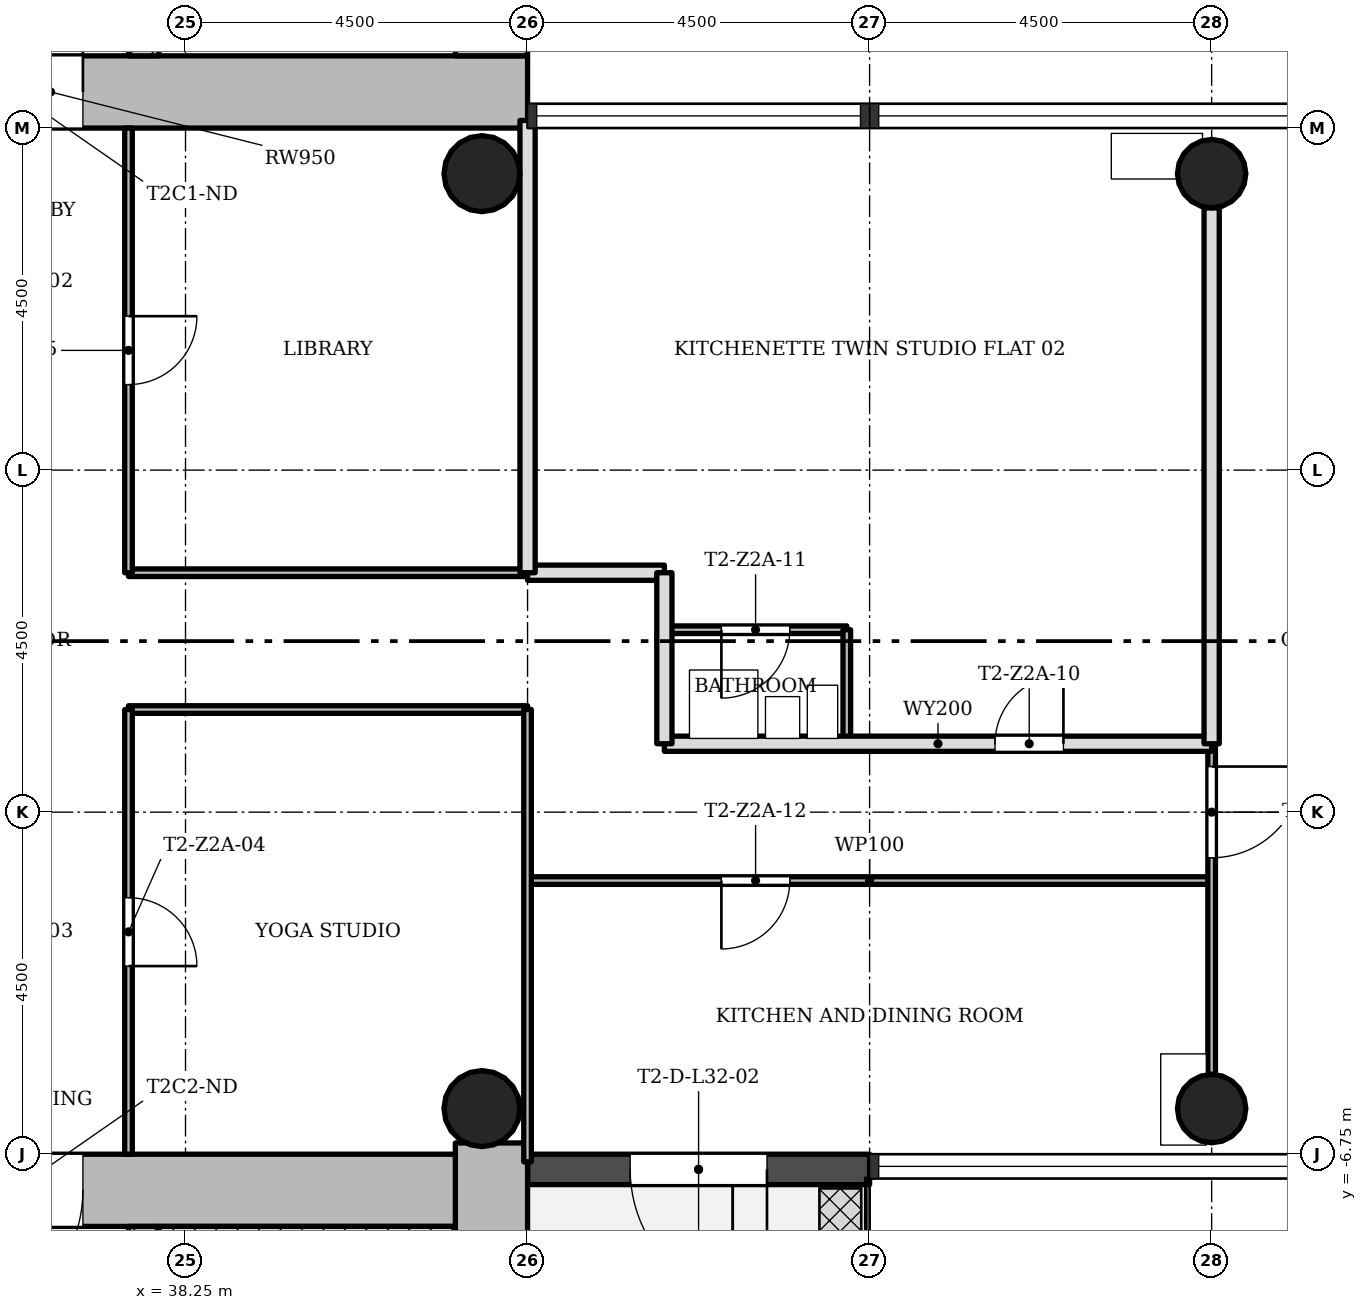
"""IFC4 building model, lengths in metres.
Left out: names, types, materials, properties, quantities, classifications, styles, units other than length and angle.
Written with IfcOpenShell. Run it as: python <this file> out.ifc"""

import sys

from ifc_helpers import new_model, si_unit, direction, frame, frame_2d, origin, origin_2d, place, context, subcontext, project, spatial, rectangle, hollow_circle, extrude, element, fill, save


model = new_model("IFC4")
c1 = context("Model", 3, precision=1e-05, world=origin(), true_north=direction((0.0, 1.0)))
c2 = subcontext(c1, "Body", "Model", "MODEL_VIEW")
j1 = project(units=[si_unit("LENGTHUNIT", "METRE"), si_unit("PLANEANGLEUNIT", "RADIAN")], contexts=[c1])
p1 = place(None, origin())
s1 = spatial("IfcSite", under=j1, at=p1, CompositionType="ELEMENT")
p2 = place(p1, origin())
s2 = spatial("IfcBuilding", under=s1, at=p2, CompositionType="ELEMENT")
p3 = place(p2, frame((0.0, 0.0, 117.4)))
s3 = spatial("IfcBuildingStorey", under=s2, at=p3, CompositionType="ELEMENT", Elevation=117.4)
p4 = place(p3, frame((30.2, 7.225, 0.0), z_axis=(0.0, 0.0, 1.0), x_axis=(1.0, 0.0, 0.0)))
e1 = element("IfcWall", 1, at=p4, inside=s3, PredefinedType="SHEAR", context=c2, shape_type="SweptSolid", body=[
    extrude(rectangle(XDim=12.55, YDim=0.95, at=frame_2d((6.275, 0.0))), origin(), (0.0, 0.0, 1.0), 3.4),
])
p5 = place(p4, frame((4.9, 0.0, 0.0)))
e2 = element("IfcOpeningElement", 2, at=p5, cuts=e1, PredefinedType="OPENING", context=c2, shape_type="SweptSolid", body=[
    extrude(rectangle(XDim=1.8, YDim=2.1, at=frame_2d((0.9, 1.05))), frame((0.0, 0.485, 0.0), z_axis=(0.0, -1.0, 0.0), x_axis=(1.0, 0.0, 0.0)), (0.0, 0.0, 1.0), 0.97),
])
p6 = place(p3, frame((42.275, 7.7, 0.0), z_axis=(0.0, 0.0, 1.0), x_axis=(0.0, 1.0, 0.0)))
e3 = element("IfcWall", 3, at=p6, inside=s3, PredefinedType="SHEAR", context=c2, shape_type="SweptSolid", body=[
    extrude(rectangle(XDim=8.05, YDim=0.95, at=frame_2d((4.025, 0.0))), origin(), (0.0, 0.0, 1.0), 3.4),
])
p7 = place(p3, frame((37.7, 7.7, 0.0), z_axis=(0.0, 0.0, 1.0), x_axis=(0.0, 1.0, 0.0)))
e4 = element("IfcWall", 4, at=p7, inside=s3, PredefinedType="SHEAR", context=c2, shape_type="SweptSolid", body=[
    extrude(rectangle(XDim=7.1, YDim=0.4, at=frame_2d((3.55, 0.0))), origin(), (0.0, 0.0, 1.0), 3.4),
])
p8 = place(p7, frame((0.8, 0.0, 0.0)))
e5 = element("IfcOpeningElement", 5, at=p8, cuts=e4, PredefinedType="OPENING", context=c2, shape_type="SweptSolid", body=[
    extrude(rectangle(XDim=1.1, YDim=2.1, at=frame_2d((0.55, 1.05))), frame((0.0, 0.21, 0.0), z_axis=(0.0, -1.0, 0.0), x_axis=(1.0, 0.0, 0.0)), (0.0, 0.0, 1.0), 0.42),
])
p9 = place(p7, frame((3.0, 0.0, 0.0)))
e6 = element("IfcOpeningElement", 6, at=p9, cuts=e4, PredefinedType="OPENING", context=c2, shape_type="SweptSolid", body=[
    extrude(rectangle(XDim=1.1, YDim=2.1, at=frame_2d((0.55, 1.05))), frame((0.0, 0.21, 0.0), z_axis=(0.0, -1.0, 0.0), x_axis=(1.0, 0.0, 0.0)), (0.0, 0.0, 1.0), 0.42),
])
p10 = place(p7, frame((5.2, 0.0, 0.0)))
e7 = element("IfcOpeningElement", 7, at=p10, cuts=e4, PredefinedType="OPENING", context=c2, shape_type="SweptSolid", body=[
    extrude(rectangle(XDim=1.1, YDim=2.1, at=frame_2d((0.55, 1.05))), frame((0.0, 0.21, 0.0), z_axis=(0.0, -1.0, 0.0), x_axis=(1.0, 0.0, 0.0)), (0.0, 0.0, 1.0), 0.42),
])
p11 = place(p3, frame((42.275, -14.8, 0.0), z_axis=(0.0, 0.0, 1.0), x_axis=(0.0, 1.0, 0.0)))
e8 = element("IfcWall", 8, at=p11, inside=s3, PredefinedType="SHEAR", context=c2, shape_type="SweptSolid", body=[
    extrude(rectangle(XDim=8.198, YDim=0.95, at=frame_2d((4.099, 0.0))), origin(), (0.0, 0.0, 1.0), 3.4),
])
p12 = place(p3, frame((41.8, -7.225, 0.0), z_axis=(0.0, 0.0, 1.0), x_axis=(-1.0, 0.0, 0.0)))
e9 = element("IfcWall", 9, at=p12, inside=s3, PredefinedType="SHEAR", context=c2, shape_type="SweptSolid", body=[
    extrude(rectangle(XDim=12.55, YDim=0.95, at=frame_2d((6.275, 0.0))), origin(), (0.0, 0.0, 1.0), 3.4),
])
p13 = place(p12, frame((4.9, 0.0, 0.0)))
e10 = element("IfcOpeningElement", 10, at=p13, cuts=e9, PredefinedType="OPENING", context=c2, shape_type="SweptSolid", body=[
    extrude(rectangle(XDim=1.8, YDim=2.1, at=frame_2d((0.9, 1.05))), frame((0.0, 0.485, 0.0), z_axis=(0.0, -1.0, 0.0), x_axis=(1.0, 0.0, 0.0)), (0.0, 0.0, 1.0), 0.97),
])
p14 = place(p3, frame((37.7, -14.8, 0.0), z_axis=(0.0, 0.0, 1.0), x_axis=(0.0, 1.0, 0.0)))
e11 = element("IfcWall", 11, at=p14, inside=s3, PredefinedType="SHEAR", context=c2, shape_type="SweptSolid", body=[
    extrude(rectangle(XDim=7.1, YDim=0.4, at=frame_2d((3.55, 0.0))), origin(), (0.0, 0.0, 1.0), 3.4),
])
p15 = place(p14, frame((5.5, 0.0, 0.0)))
e12 = element("IfcOpeningElement", 12, at=p15, cuts=e11, PredefinedType="OPENING", context=c2, shape_type="SweptSolid", body=[
    extrude(rectangle(XDim=0.9, YDim=2.1, at=frame_2d((0.45, 1.05))), frame((0.0, 0.21, 0.0), z_axis=(0.0, -1.0, 0.0), x_axis=(1.0, 0.0, 0.0)), (0.0, 0.0, 1.0), 0.42),
])
for number, where, z_axis, x_axis in (
    (13, (51.75, -6.15, 0.0), (0.0, 0.0, 1.0), (1.0, 0.0, 0.0)),
    (14, (51.75, 6.15, 0.0), (0.0, 0.0, 1.0), (1.0, 0.0, 0.0)),
):
    element("IfcColumn", number, at=place(p3, frame(where, z_axis=z_axis, x_axis=x_axis)), inside=s3, PredefinedType="COLUMN", context=c2, shape_type="SweptSolid", body=[
        extrude(hollow_circle(Radius=0.45, WallThickness=0.032, at=origin_2d()), origin(), (0.0, 0.0, 1.0), 3.4),
    ])
for number, where, z_axis, x_axis in (
    (15, (42.15, -6.15, 0.0), (0.0, 0.0, 1.0), (1.0, 0.0, 0.0)),
    (16, (42.15, 6.15, 0.0), (0.0, 0.0, 1.0), (1.0, 0.0, 0.0)),
):
    element("IfcColumn", number, at=place(p3, frame(where, z_axis=z_axis, x_axis=x_axis)), inside=s3, PredefinedType="COLUMN", context=c2, shape_type="SweptSolid", body=[
        extrude(hollow_circle(Radius=0.5, WallThickness=0.036, at=origin_2d()), origin(), (0.0, 0.0, 1.0), 3.4),
    ])
p16 = place(p3, frame((42.75, -6.95, -0.02), z_axis=(0.0, 0.0, 1.0), x_axis=(1.0, 0.0, 0.0)))
e17 = element("IfcWall", 17, at=p16, inside=s3, PredefinedType="STANDARD", context=c2, shape_type="SweptSolid", body=[
    extrude(rectangle(XDim=4.5, YDim=0.4, at=frame_2d((2.25, 0.0))), origin(), (0.0, 0.0, 1.0), 3.12),
])
p17 = place(p16, frame((1.35, 0.0, 0.02)))
e18 = element("IfcOpeningElement", 18, at=p17, cuts=e17, PredefinedType="OPENING", context=c2, shape_type="SweptSolid", body=[
    extrude(rectangle(XDim=1.8, YDim=2.1, at=frame_2d((0.9, 1.05))), frame((0.0, 0.21, 0.0), z_axis=(0.0, -1.0, 0.0), x_axis=(1.0, 0.0, 0.0)), (0.0, 0.0, 1.0), 0.42),
])
p18 = place(p3, frame((51.75, -3.15, 0.0), z_axis=(0.0, 0.0, 1.0), x_axis=(-1.0, 0.0, 0.0)))
e19 = element("IfcWall", 19, at=p18, inside=s3, PredefinedType="PARTITIONING", context=c2, shape_type="SweptSolid", body=[
    extrude(rectangle(XDim=9.0, YDim=0.1, at=frame_2d((4.5, 0.0))), origin(), (0.0, 0.0, 1.0), 3.0),
])
p19 = place(p18, frame((5.55, 0.0, 0.0)))
e20 = element("IfcOpeningElement", 20, at=p19, cuts=e19, PredefinedType="OPENING", context=c2, shape_type="SweptSolid", body=[
    extrude(rectangle(XDim=0.9, YDim=2.1, at=frame_2d((0.45, 1.05))), frame((0.0, 0.06, 0.0), z_axis=(0.0, -1.0, 0.0), x_axis=(1.0, 0.0, 0.0)), (0.0, 0.0, 1.0), 0.12),
])
p20 = place(p3, frame((51.75, -1.35, 0.0), z_axis=(0.0, 0.0, 1.0), x_axis=(-1.0, 0.0, 0.0)))
e21 = element("IfcWall", 21, at=p20, inside=s3, PredefinedType="SOLIDWALL", context=c2, shape_type="SweptSolid", body=[
    extrude(rectangle(XDim=7.2, YDim=0.2, at=frame_2d((3.6, 0.0))), origin(), (0.0, 0.0, 1.0), 3.0),
])
p21 = place(p20, frame((1.95, 0.0, 0.0)))
e22 = element("IfcOpeningElement", 22, at=p21, cuts=e21, PredefinedType="OPENING", context=c2, shape_type="SweptSolid", body=[
    extrude(rectangle(XDim=0.9, YDim=2.1, at=frame_2d((0.45, 1.05))), frame((0.0, 0.11, 0.0), z_axis=(0.0, -1.0, 0.0), x_axis=(1.0, 0.0, 0.0)), (0.0, 0.0, 1.0), 0.22),
])
p22 = place(p3, frame((42.75, -0.9, 0.0), z_axis=(0.0, 0.0, 1.0), x_axis=(-1.0, 0.0, 0.0)))
e23 = element("IfcWall", 23, at=p22, inside=s3, PredefinedType="PARTITIONING", context=c2, shape_type="SweptSolid", body=[
    extrude(rectangle(XDim=5.25, YDim=0.1, at=frame_2d((2.625, 0.0))), origin(), (0.0, 0.0, 1.0), 3.0),
])
p23 = place(p3, frame((46.95, 0.15, 0.0), z_axis=(0.0, 0.0, 1.0), x_axis=(-1.0, 0.0, 0.0)))
e24 = element("IfcWall", 24, at=p23, inside=s3, PredefinedType="PARTITIONING", context=c2, shape_type="SweptSolid", body=[
    extrude(rectangle(XDim=2.4, YDim=0.1, at=frame_2d((1.2, 0.0))), origin(), (0.0, 0.0, 1.0), 3.0),
])
p24 = place(p23, frame((0.75, 0.0, 0.0)))
e25 = element("IfcOpeningElement", 25, at=p24, cuts=e24, PredefinedType="OPENING", context=c2, shape_type="SweptSolid", body=[
    extrude(rectangle(XDim=0.9, YDim=2.1, at=frame_2d((0.45, 1.05))), frame((0.0, 0.06, 0.0), z_axis=(0.0, -1.0, 0.0), x_axis=(1.0, 0.0, 0.0)), (0.0, 0.0, 1.0), 0.12),
])
p25 = place(p3, frame((42.75, 0.9, 0.0), z_axis=(0.0, 0.0, 1.0), x_axis=(-1.0, 0.0, 0.0)))
e26 = element("IfcWall", 26, at=p25, inside=s3, PredefinedType="PARTITIONING", context=c2, shape_type="SweptSolid", body=[
    extrude(rectangle(XDim=5.25, YDim=0.1, at=frame_2d((2.625, 0.0))), origin(), (0.0, 0.0, 1.0), 3.0),
])
p26 = place(p3, frame((44.55, 0.9, 0.0), z_axis=(0.0, 0.0, 1.0), x_axis=(-1.0, 0.0, 0.0)))
e27 = element("IfcWall", 27, at=p26, inside=s3, PredefinedType="SOLIDWALL", context=c2, shape_type="SweptSolid", body=[
    extrude(rectangle(XDim=1.8, YDim=0.2, at=frame_2d((0.9, 0.0))), origin(), (0.0, 0.0, 1.0), 3.0),
])
p27 = place(p3, frame((51.75, -5.7, 0.0), z_axis=(0.0, 0.0, 1.0), x_axis=(0.0, 1.0, 0.0)))
e28 = element("IfcWall", 28, at=p27, inside=s3, PredefinedType="PARTITIONING", context=c2, shape_type="SweptSolid", body=[
    extrude(rectangle(XDim=4.35, YDim=0.1, at=frame_2d((2.175, 0.0))), origin(), (0.0, 0.0, 1.0), 3.0),
])
p28 = place(p27, frame((2.85, 0.0, 0.0)))
e29 = element("IfcOpeningElement", 29, at=p28, cuts=e28, PredefinedType="OPENING", context=c2, shape_type="SweptSolid", body=[
    extrude(rectangle(XDim=1.2, YDim=2.1, at=frame_2d((0.6, 1.05))), frame((0.0, 0.06, 0.0), z_axis=(0.0, -1.0, 0.0), x_axis=(1.0, 0.0, 0.0)), (0.0, 0.0, 1.0), 0.12),
])
p29 = place(p3, frame((51.75, -1.35, 0.0), z_axis=(0.0, 0.0, 1.0), x_axis=(0.0, 1.0, 0.0)))
e30 = element("IfcWall", 30, at=p29, inside=s3, PredefinedType="SOLIDWALL", context=c2, shape_type="SweptSolid", body=[
    extrude(rectangle(XDim=7.05, YDim=0.2, at=frame_2d((3.525, 0.0))), origin(), (0.0, 0.0, 1.0), 3.0),
])
p30 = place(p3, frame((46.95, -1.35, 0.0), z_axis=(0.0, 0.0, 1.0), x_axis=(0.0, 1.0, 0.0)))
e31 = element("IfcWall", 31, at=p30, inside=s3, PredefinedType="PARTITIONING", context=c2, shape_type="SweptSolid", body=[
    extrude(rectangle(XDim=1.5, YDim=0.1, at=frame_2d((0.75, 0.0))), origin(), (0.0, 0.0, 1.0), 3.0),
])
p31 = place(p3, frame((44.55, -1.35, 0.0), z_axis=(0.0, 0.0, 1.0), x_axis=(0.0, 1.0, 0.0)))
e32 = element("IfcWall", 32, at=p31, inside=s3, PredefinedType="SOLIDWALL", context=c2, shape_type="SweptSolid", body=[
    extrude(rectangle(XDim=2.25, YDim=0.2, at=frame_2d((1.125, 0.0))), origin(), (0.0, 0.0, 1.0), 3.0),
])
p32 = place(p3, frame((42.75, -6.85, 0.0), z_axis=(0.0, 0.0, 1.0), x_axis=(0.0, 1.0, 0.0)))
e33 = element("IfcWall", 33, at=p32, inside=s3, PredefinedType="PARTITIONING", context=c2, shape_type="SweptSolid", body=[
    extrude(rectangle(XDim=5.95, YDim=0.1, at=frame_2d((2.975, 0.0))), origin(), (0.0, 0.0, 1.0), 3.0),
])
p33 = place(p3, frame((42.75, 0.9, 0.0), z_axis=(0.0, 0.0, 1.0), x_axis=(0.0, 1.0, 0.0)))
e34 = element("IfcWall", 34, at=p33, inside=s3, PredefinedType="SOLIDWALL", context=c2, shape_type="SweptSolid", body=[
    extrude(rectangle(XDim=5.95, YDim=0.2, at=frame_2d((2.975, 0.0))), origin(), (0.0, 0.0, 1.0), 3.0),
])
p34 = place(p3, frame((37.5, -6.75, 0.0), z_axis=(0.0, 0.0, 1.0), x_axis=(0.0, 1.0, 0.0)))
e35 = element("IfcWall", 35, at=p34, inside=s3, PredefinedType="PARTITIONING", context=c2, shape_type="SweptSolid", body=[
    extrude(rectangle(XDim=5.85, YDim=0.1, at=frame_2d((2.925, 0.0))), origin(), (0.0, 0.0, 1.0), 3.0),
])
p35 = place(p34, frame((2.475, 0.0, 0.0)))
e36 = element("IfcOpeningElement", 36, at=p35, cuts=e35, PredefinedType="OPENING", context=c2, shape_type="SweptSolid", body=[
    extrude(rectangle(XDim=0.9, YDim=2.1, at=frame_2d((0.45, 1.05))), frame((0.0, 0.06, 0.0), z_axis=(0.0, -1.0, 0.0), x_axis=(1.0, 0.0, 0.0)), (0.0, 0.0, 1.0), 0.12),
])
p36 = place(p3, frame((37.5, 0.9, 0.0), z_axis=(0.0, 0.0, 1.0), x_axis=(0.0, 1.0, 0.0)))
e37 = element("IfcWall", 37, at=p36, inside=s3, PredefinedType="PARTITIONING", context=c2, shape_type="SweptSolid", body=[
    extrude(rectangle(XDim=5.85, YDim=0.1, at=frame_2d((2.925, 0.0))), origin(), (0.0, 0.0, 1.0), 3.0),
])
p37 = place(p36, frame((2.475, 0.0, 0.0)))
e38 = element("IfcOpeningElement", 38, at=p37, cuts=e37, PredefinedType="OPENING", context=c2, shape_type="SweptSolid", body=[
    extrude(rectangle(XDim=0.9, YDim=2.1, at=frame_2d((0.45, 1.05))), frame((0.0, 0.06, 0.0), z_axis=(0.0, -1.0, 0.0), x_axis=(1.0, 0.0, 0.0)), (0.0, 0.0, 1.0), 0.12),
])
p38 = place(p3, frame((37.9, -7.825, 0.0), z_axis=(0.0, 0.0, 1.0), x_axis=(1.0, 0.0, 0.0)))
e39 = element("IfcWall", 39, at=p38, inside=s3, PredefinedType="SHEAR", context=c2, shape_type="SweptSolid", body=[
    extrude(rectangle(XDim=3.9, YDim=0.25, at=frame_2d((1.95, 0.0))), origin(), (0.0, 0.0, 1.0), 3.4),
])
p39 = place(p17, origin())
e40 = element("IfcDoor", 40, at=p39, inside=s3, OperationType="SINGLE_SWING_RIGHT", PredefinedType="DOOR", context=c2, shape_type="SweptSolid", body=[
    extrude(rectangle(XDim=1.8, YDim=2.1, at=frame_2d((0.9, 1.05))), frame((0.0, 0.025, 0.0), z_axis=(0.0, -1.0, 0.0), x_axis=(1.0, 0.0, 0.0)), (0.0, 0.0, 1.0), 0.05),
])
fill(e18, e40)
p40 = place(p35, origin())
e41 = element("IfcDoor", 41, at=p40, inside=s3, OperationType="SINGLE_SWING_LEFT", PredefinedType="DOOR", context=c2, shape_type="SweptSolid", body=[
    extrude(rectangle(XDim=0.9, YDim=2.1, at=frame_2d((0.45, 1.05))), frame((0.0, 0.025, 0.0), z_axis=(0.0, -1.0, 0.0), x_axis=(1.0, 0.0, 0.0)), (0.0, 0.0, 1.0), 0.05),
])
fill(e36, e41)
p41 = place(p37, origin())
e42 = element("IfcDoor", 42, at=p41, inside=s3, OperationType="SINGLE_SWING_RIGHT", PredefinedType="DOOR", context=c2, shape_type="SweptSolid", body=[
    extrude(rectangle(XDim=0.9, YDim=2.1, at=frame_2d((0.45, 1.05))), frame((0.0, 0.025, 0.0), z_axis=(0.0, -1.0, 0.0), x_axis=(1.0, 0.0, 0.0)), (0.0, 0.0, 1.0), 0.05),
])
fill(e38, e42)
p42 = place(p21, origin())
e43 = element("IfcDoor", 43, at=p42, inside=s3, OperationType="SINGLE_SWING_LEFT", PredefinedType="DOOR", context=c2, shape_type="SweptSolid", body=[
    extrude(rectangle(XDim=0.9, YDim=2.1, at=frame_2d((0.45, 1.05))), frame((0.0, 0.025, 0.0), z_axis=(0.0, -1.0, 0.0), x_axis=(1.0, 0.0, 0.0)), (0.0, 0.0, 1.0), 0.05),
])
fill(e22, e43)
p43 = place(p24, origin())
e44 = element("IfcDoor", 44, at=p43, inside=s3, OperationType="SINGLE_SWING_LEFT", PredefinedType="DOOR", context=c2, shape_type="SweptSolid", body=[
    extrude(rectangle(XDim=0.9, YDim=2.1, at=frame_2d((0.45, 1.05))), frame((0.0, 0.025, 0.0), z_axis=(0.0, -1.0, 0.0), x_axis=(1.0, 0.0, 0.0)), (0.0, 0.0, 1.0), 0.05),
])
fill(e25, e44)
p44 = place(p19, origin())
e45 = element("IfcDoor", 45, at=p44, inside=s3, OperationType="SINGLE_SWING_LEFT", PredefinedType="DOOR", context=c2, shape_type="SweptSolid", body=[
    extrude(rectangle(XDim=0.9, YDim=2.1, at=frame_2d((0.45, 1.05))), frame((0.0, 0.025, 0.0), z_axis=(0.0, -1.0, 0.0), x_axis=(1.0, 0.0, 0.0)), (0.0, 0.0, 1.0), 0.05),
])
fill(e20, e45)
p45 = place(p28, origin())
e46 = element("IfcDoor", 46, at=p45, inside=s3, OperationType="SINGLE_SWING_RIGHT", PredefinedType="DOOR", context=c2, shape_type="SweptSolid", body=[
    extrude(rectangle(XDim=1.2, YDim=2.1, at=frame_2d((0.6, 1.05))), frame((0.0, 0.025, 0.0), z_axis=(0.0, -1.0, 0.0), x_axis=(1.0, 0.0, 0.0)), (0.0, 0.0, 1.0), 0.05),
])
fill(e29, e46)
p46 = place(p5, origin())
e47 = element("IfcDoor", 47, at=p46, inside=s3, OperationType="SINGLE_SWING_LEFT", PredefinedType="DOOR", context=c2, shape_type="SweptSolid", body=[
    extrude(rectangle(XDim=1.8, YDim=2.1, at=frame_2d((0.9, 1.05))), frame((0.0, 0.025, 0.0), z_axis=(0.0, -1.0, 0.0), x_axis=(1.0, 0.0, 0.0)), (0.0, 0.0, 1.0), 0.05),
])
fill(e2, e47)
p47 = place(p13, origin())
e48 = element("IfcDoor", 48, at=p47, inside=s3, OperationType="SINGLE_SWING_LEFT", PredefinedType="DOOR", context=c2, shape_type="SweptSolid", body=[
    extrude(rectangle(XDim=1.8, YDim=2.1, at=frame_2d((0.9, 1.05))), frame((0.0, 0.025, 0.0), z_axis=(0.0, -1.0, 0.0), x_axis=(1.0, 0.0, 0.0)), (0.0, 0.0, 1.0), 0.05),
])
fill(e10, e48)
save(model, sys.argv[1])
